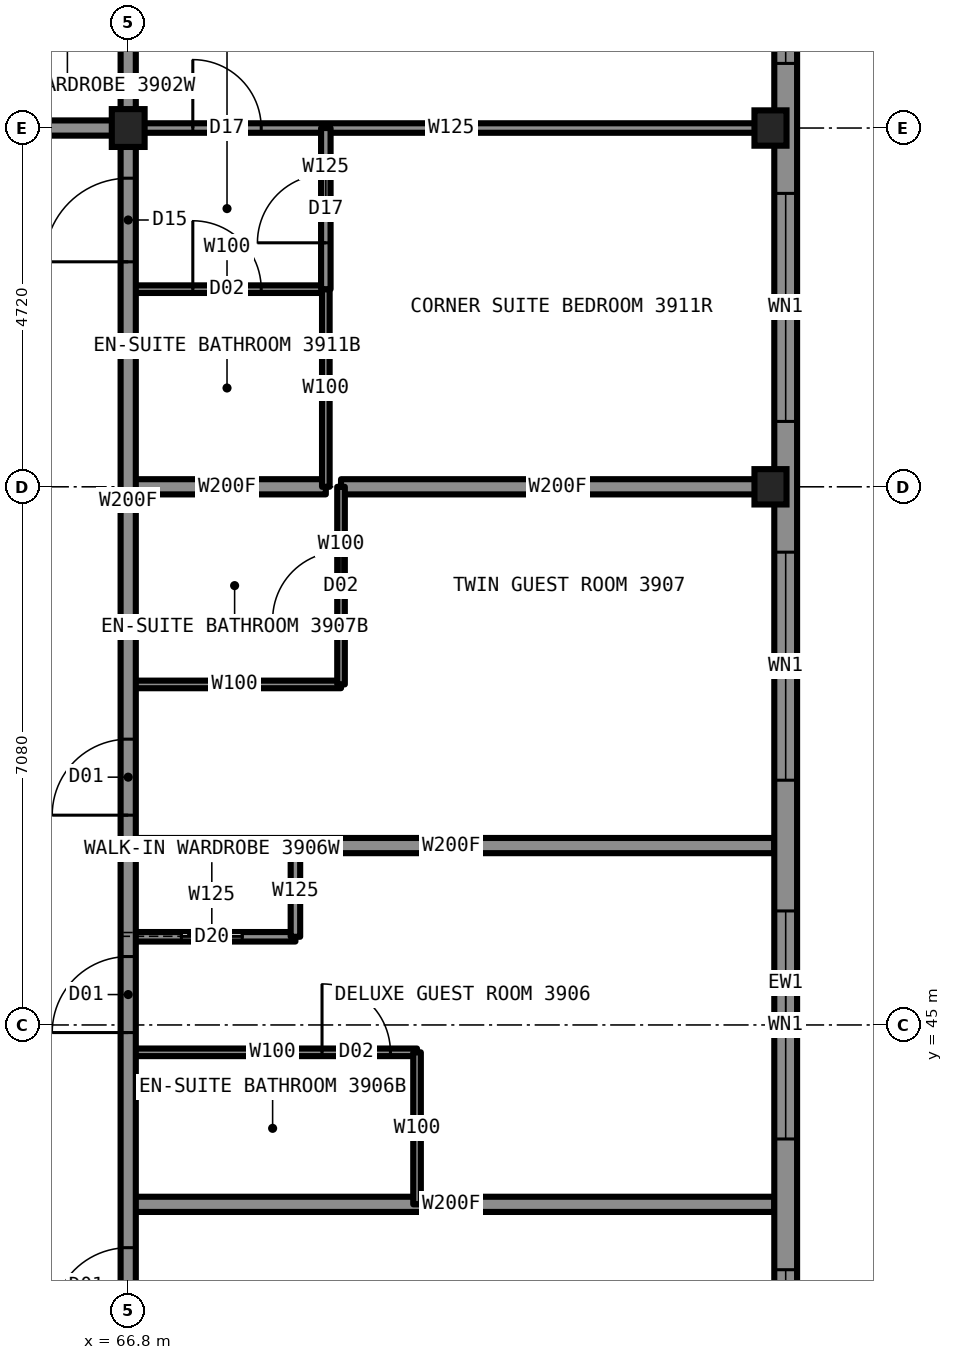
"""IFC4 building model, lengths in metres.
Left out: names, types, materials, properties, quantities, classifications, styles, units other than length and angle.
Written with IfcOpenShell. Run it as: python <this file> out.ifc"""

import sys

from ifc_helpers import new_model, si_unit, direction, frame, frame_2d, origin, origin_2d, place, context, subcontext, project, spatial, rectangle, i_section, extrude, element, fill, save


model = new_model("IFC4")
c1 = context("Model", 3, precision=1e-05, world=origin(), true_north=direction((0.0, 1.0)))
c2 = subcontext(c1, "Body", "Model", "MODEL_VIEW")
j1 = project(units=[si_unit("LENGTHUNIT", "METRE"), si_unit("PLANEANGLEUNIT", "RADIAN")], contexts=[c1])
p1 = place(None, origin())
s1 = spatial("IfcSite", under=j1, at=p1, CompositionType="ELEMENT")
p2 = place(p1, origin())
s2 = spatial("IfcBuilding", under=s1, at=p2, CompositionType="ELEMENT")
p3 = place(p2, frame((0.0, 0.0, 145.9)))
s3 = spatial("IfcBuildingStorey", under=s2, at=p3, CompositionType="ELEMENT", Elevation=145.9)
for number, where, z_axis, x_axis in (
    (1, (75.25, 52.08, 0.0), (0.0, 0.0, 1.0), (1.0, 0.0, 0.0)),
    (2, (75.25, 56.8, 0.0), (0.0, 0.0, 1.0), (1.0, 0.0, 0.0)),
):
    element("IfcColumn", number, at=place(p3, frame(where, z_axis=z_axis, x_axis=x_axis)), inside=s3, PredefinedType="COLUMN", context=c2, shape_type="SweptSolid", body=[
        extrude(i_section(OverallWidth=0.422, OverallDepth=0.465, WebThickness=0.045, FlangeThickness=0.073, at=origin_2d()), origin(), (0.0, 0.0, 1.0), 3.5),
    ])
p4 = place(p3, frame((66.8, 56.8, 0.0), z_axis=(0.0, 0.0, 1.0), x_axis=(1.0, 0.0, 0.0)))
e3 = element("IfcColumn", 3, at=p4, inside=s3, PredefinedType="COLUMN", context=c2, shape_type="SweptSolid", body=[
    extrude(i_section(OverallWidth=0.432, OverallDepth=0.498, WebThickness=0.056, FlangeThickness=0.089, at=origin_2d()), origin(), (0.0, 0.0, 1.0), 3.5),
])
p5 = place(p3, frame((66.8, 44.64, 0.0), z_axis=(0.0, 0.0, 1.0), x_axis=(1.0, 0.0, 0.0)))
e4 = element("IfcWall", 4, at=p5, inside=s3, PredefinedType="PARTITIONING", context=c2, shape_type="SweptSolid", body=[
    extrude(rectangle(XDim=3.8, YDim=0.1, at=frame_2d((1.9, 0.0))), origin(), (0.0, 0.0, 1.0), 3.33),
])
p6 = place(p5, frame((2.55, 0.0, 0.0)))
e5 = element("IfcOpeningElement", 5, at=p6, cuts=e4, PredefinedType="OPENING", context=c2, shape_type="SweptSolid", body=[
    extrude(rectangle(XDim=0.9, YDim=2.1, at=frame_2d((0.45, 1.05))), frame((0.0, 0.06, 0.0), z_axis=(0.0, -1.0, 0.0), x_axis=(1.0, 0.0, 0.0)), (0.0, 0.0, 1.0), 0.12),
])
p7 = place(p3, frame((66.8, 42.64, 0.0), z_axis=(0.0, 0.0, 1.0), x_axis=(1.0, 0.0, 0.0)))
e6 = element("IfcWall", 6, at=p7, inside=s3, PredefinedType="PARTITIONING", context=c2, shape_type="SweptSolid", body=[
    extrude(rectangle(XDim=8.5, YDim=0.2, at=frame_2d((4.25, 0.0))), origin(), (0.0, 0.0, 1.0), 2.731),
])
p8 = place(p3, frame((66.8, 46.16, 0.0), z_axis=(0.0, 0.0, 1.0), x_axis=(1.0, 0.0, 0.0)))
e7 = element("IfcWall", 7, at=p8, inside=s3, PredefinedType="PARTITIONING", context=c2, shape_type="SweptSolid", body=[
    extrude(rectangle(XDim=2.2, YDim=0.125, at=frame_2d((1.1, 0.0))), origin(), (0.0, 0.0, 1.0), 3.33),
])
p9 = place(p8, frame((0.7, 0.0, 0.0)))
e8 = element("IfcOpeningElement", 8, at=p9, cuts=e7, PredefinedType="OPENING", context=c2, shape_type="SweptSolid", body=[
    extrude(rectangle(XDim=0.8, YDim=2.1, at=frame_2d((0.4, 1.05))), frame((0.0, 0.073, 0.0), z_axis=(0.0, -1.0, 0.0), x_axis=(1.0, 0.0, 0.0)), (0.0, 0.0, 1.0), 0.145),
])
p10 = place(p3, frame((43.2, 56.8, 0.0), z_axis=(0.0, 0.0, 1.0), x_axis=(1.0, 0.0, 0.0)))
e9 = element("IfcWall", 9, at=p10, inside=s3, PredefinedType="PARTITIONING", context=c2, shape_type="SweptSolid", body=[
    extrude(rectangle(XDim=23.6, YDim=0.2, at=frame_2d((11.8, 0.0))), origin(), (0.0, 0.0, 1.0), 3.33),
])
p11 = place(p10, frame((1.85, 0.0, 0.0)))
e10 = element("IfcOpeningElement", 10, at=p11, cuts=e9, PredefinedType="OPENING", context=c2, shape_type="SweptSolid", body=[
    extrude(rectangle(XDim=1.1, YDim=2.2, at=frame_2d((0.55, 1.1))), frame((0.0, 0.11, 0.0), z_axis=(0.0, -1.0, 0.0), x_axis=(1.0, 0.0, 0.0)), (0.0, 0.0, 1.0), 0.22),
])
p12 = place(p10, frame((17.16, 0.0, 0.0)))
e11 = element("IfcOpeningElement", 11, at=p12, cuts=e9, PredefinedType="OPENING", context=c2, shape_type="SweptSolid", body=[
    extrude(rectangle(XDim=1.0, YDim=2.2, at=frame_2d((0.5, 1.1))), frame((0.0, 0.11, 0.0), z_axis=(0.0, -1.0, 0.0), x_axis=(1.0, 0.0, 0.0)), (0.0, 0.0, 1.0), 0.22),
])
p13 = place(p3, frame((66.8, 56.8, 0.0), z_axis=(0.0, 0.0, 1.0), x_axis=(1.0, 0.0, 0.0)))
e12 = element("IfcWall", 12, at=p13, inside=s3, PredefinedType="PARTITIONING", context=c2, shape_type="SweptSolid", body=[
    extrude(rectangle(XDim=8.5, YDim=0.125, at=frame_2d((4.25, 0.0))), origin(), (0.0, 0.0, 1.0), 2.573),
])
p14 = place(p13, frame((0.85, 0.0, 0.0)))
e13 = element("IfcOpeningElement", 13, at=p14, cuts=e12, PredefinedType="OPENING", context=c2, shape_type="SweptSolid", body=[
    extrude(rectangle(XDim=0.9, YDim=2.2, at=frame_2d((0.45, 1.1))), frame((0.0, 0.073, 0.0), z_axis=(0.0, -1.0, 0.0), x_axis=(1.0, 0.0, 0.0)), (0.0, 0.0, 1.0), 0.145),
])
p15 = place(p3, frame((66.8, 47.36, 0.0), z_axis=(0.0, 0.0, 1.0), x_axis=(1.0, 0.0, 0.0)))
e14 = element("IfcWall", 14, at=p15, inside=s3, PredefinedType="PARTITIONING", context=c2, shape_type="SweptSolid", body=[
    extrude(rectangle(XDim=8.5, YDim=0.2, at=frame_2d((4.25, 0.0))), origin(), (0.0, 0.0, 1.0), 2.731),
])
p16 = place(p3, frame((66.8, 49.48, 0.0), z_axis=(0.0, 0.0, 1.0), x_axis=(1.0, 0.0, 0.0)))
e15 = element("IfcWall", 15, at=p16, inside=s3, PredefinedType="PARTITIONING", context=c2, shape_type="SweptSolid", body=[
    extrude(rectangle(XDim=2.8, YDim=0.1, at=frame_2d((1.4, 0.0))), origin(), (0.0, 0.0, 1.0), 3.33),
])
p17 = place(p3, frame((66.8, 52.08, 0.0), z_axis=(0.0, 0.0, 1.0), x_axis=(1.0, 0.0, 0.0)))
e16 = element("IfcWall", 16, at=p17, inside=s3, PredefinedType="PARTITIONING", context=c2, shape_type="SweptSolid", body=[
    extrude(rectangle(XDim=2.6, YDim=0.2, at=frame_2d((1.3, 0.0))), origin(), (0.0, 0.0, 1.0), 2.573),
])
p18 = place(p3, frame((69.6, 52.08, 0.0), z_axis=(0.0, 0.0, 1.0), x_axis=(1.0, 0.0, 0.0)))
e17 = element("IfcWall", 17, at=p18, inside=s3, PredefinedType="PARTITIONING", context=c2, shape_type="SweptSolid", body=[
    extrude(rectangle(XDim=5.7, YDim=0.2, at=frame_2d((2.85, 0.0))), origin(), (0.0, 0.0, 1.0), 2.573),
])
p19 = place(p3, frame((66.8, 54.68, 0.0), z_axis=(0.0, 0.0, 1.0), x_axis=(1.0, 0.0, 0.0)))
e18 = element("IfcWall", 18, at=p19, inside=s3, PredefinedType="PARTITIONING", context=c2, shape_type="SweptSolid", body=[
    extrude(rectangle(XDim=2.6, YDim=0.1, at=frame_2d((1.3, 0.0))), origin(), (0.0, 0.0, 1.0), 3.33),
])
p20 = place(p19, frame((0.85, 0.0, 0.0)))
e19 = element("IfcOpeningElement", 19, at=p20, cuts=e18, PredefinedType="OPENING", context=c2, shape_type="SweptSolid", body=[
    extrude(rectangle(XDim=0.9, YDim=2.1, at=frame_2d((0.45, 1.05))), frame((0.0, 0.06, 0.0), z_axis=(0.0, -1.0, 0.0), x_axis=(1.0, 0.0, 0.0)), (0.0, 0.0, 1.0), 0.12),
])
p21 = place(p3, frame((66.8, 33.2, 0.0), z_axis=(0.0, 0.0, 1.0), x_axis=(0.0, 1.0, 0.0)))
e20 = element("IfcWall", 20, at=p21, inside=s3, PredefinedType="PARTITIONING", context=c2, shape_type="SweptSolid", body=[
    extrude(rectangle(XDim=23.6, YDim=0.2, at=frame_2d((11.8, 0.0))), origin(), (0.0, 0.0, 1.0), 3.33),
])
p22 = place(p21, frame((7.87, 0.0, 0.0)))
e21 = element("IfcOpeningElement", 21, at=p22, cuts=e20, PredefinedType="OPENING", context=c2, shape_type="SweptSolid", body=[
    extrude(rectangle(XDim=1.0, YDim=2.2, at=frame_2d((0.5, 1.1))), frame((0.0, 0.11, 0.0), z_axis=(0.0, -1.0, 0.0), x_axis=(1.0, 0.0, 0.0)), (0.0, 0.0, 1.0), 0.22),
])
p23 = place(p21, frame((11.7, 0.0, 0.0)))
e22 = element("IfcOpeningElement", 22, at=p23, cuts=e20, PredefinedType="OPENING", context=c2, shape_type="SweptSolid", body=[
    extrude(rectangle(XDim=1.0, YDim=2.2, at=frame_2d((0.5, 1.1))), frame((0.0, 0.11, 0.0), z_axis=(0.0, -1.0, 0.0), x_axis=(1.0, 0.0, 0.0)), (0.0, 0.0, 1.0), 0.22),
])
p24 = place(p21, frame((14.56, 0.0, 0.0)))
e23 = element("IfcOpeningElement", 23, at=p24, cuts=e20, PredefinedType="OPENING", context=c2, shape_type="SweptSolid", body=[
    extrude(rectangle(XDim=1.0, YDim=2.2, at=frame_2d((0.5, 1.1))), frame((0.0, 0.11, 0.0), z_axis=(0.0, -1.0, 0.0), x_axis=(1.0, 0.0, 0.0)), (0.0, 0.0, 1.0), 0.22),
])
p25 = place(p21, frame((21.84, 0.0, 0.0)))
e24 = element("IfcOpeningElement", 24, at=p25, cuts=e20, PredefinedType="OPENING", context=c2, shape_type="SweptSolid", body=[
    extrude(rectangle(XDim=1.1, YDim=2.2, at=frame_2d((0.55, 1.1))), frame((0.0, 0.11, 0.0), z_axis=(0.0, -1.0, 0.0), x_axis=(1.0, 0.0, 0.0)), (0.0, 0.0, 1.0), 0.22),
])
p26 = place(p21, frame((0.66, 0.0, 0.0)))
e25 = element("IfcOpeningElement", 25, at=p26, cuts=e20, PredefinedType="OPENING", context=c2, shape_type="SweptSolid", body=[
    extrude(rectangle(XDim=1.1, YDim=2.2, at=frame_2d((0.55, 1.1))), frame((0.0, 0.11, 0.0), z_axis=(0.0, -1.0, 0.0), x_axis=(1.0, 0.0, 0.0)), (0.0, 0.0, 1.0), 0.22),
])
p27 = place(p3, frame((66.8, 56.8, 0.0), z_axis=(0.0, 0.0, 1.0), x_axis=(0.0, 1.0, 0.0)))
e26 = element("IfcWall", 26, at=p27, inside=s3, PredefinedType="PARTITIONING", context=c2, shape_type="SweptSolid", body=[
    extrude(rectangle(XDim=8.5, YDim=0.2, at=frame_2d((4.25, 0.0))), origin(), (0.0, 0.0, 1.0), 2.573),
])
p28 = place(p3, frame((69.0, 46.16, 0.0), z_axis=(0.0, 0.0, 1.0), x_axis=(0.0, 1.0, 0.0)))
e27 = element("IfcWall", 27, at=p28, inside=s3, PredefinedType="PARTITIONING", context=c2, shape_type="SweptSolid", body=[
    extrude(rectangle(XDim=1.2, YDim=0.125, at=frame_2d((0.6, 0.0))), origin(), (0.0, 0.0, 1.0), 3.33),
])
p29 = place(p3, frame((69.4, 52.08, 0.0), z_axis=(0.0, 0.0, 1.0), x_axis=(0.0, 1.0, 0.0)))
e28 = element("IfcWall", 28, at=p29, inside=s3, PredefinedType="PARTITIONING", context=c2, shape_type="SweptSolid", body=[
    extrude(rectangle(XDim=2.6, YDim=0.1, at=frame_2d((1.3, 0.0))), origin(), (0.0, 0.0, 1.0), 3.33),
])
p30 = place(p3, frame((69.4, 54.68, 0.0), z_axis=(0.0, 0.0, 1.0), x_axis=(0.0, 1.0, 0.0)))
e29 = element("IfcWall", 29, at=p30, inside=s3, PredefinedType="PARTITIONING", context=c2, shape_type="SweptSolid", body=[
    extrude(rectangle(XDim=2.12, YDim=0.125, at=frame_2d((1.06, 0.0))), origin(), (0.0, 0.0, 1.0), 3.33),
])
p31 = place(p30, frame((0.61, 0.0, 0.0)))
e30 = element("IfcOpeningElement", 30, at=p31, cuts=e29, PredefinedType="OPENING", context=c2, shape_type="SweptSolid", body=[
    extrude(rectangle(XDim=0.9, YDim=2.2, at=frame_2d((0.45, 1.1))), frame((0.0, 0.073, 0.0), z_axis=(0.0, -1.0, 0.0), x_axis=(1.0, 0.0, 0.0)), (0.0, 0.0, 1.0), 0.145),
])
p32 = place(p3, frame((69.6, 49.48, 0.0), z_axis=(0.0, 0.0, 1.0), x_axis=(0.0, 1.0, 0.0)))
e31 = element("IfcWall", 31, at=p32, inside=s3, PredefinedType="PARTITIONING", context=c2, shape_type="SweptSolid", body=[
    extrude(rectangle(XDim=2.6, YDim=0.1, at=frame_2d((1.3, 0.0))), origin(), (0.0, 0.0, 1.0), 3.33),
])
p33 = place(p32, frame((0.85, 0.0, 0.0)))
e32 = element("IfcOpeningElement", 32, at=p33, cuts=e31, PredefinedType="OPENING", context=c2, shape_type="SweptSolid", body=[
    extrude(rectangle(XDim=0.9, YDim=2.1, at=frame_2d((0.45, 1.05))), frame((0.0, 0.06, 0.0), z_axis=(0.0, -1.0, 0.0), x_axis=(1.0, 0.0, 0.0)), (0.0, 0.0, 1.0), 0.12),
])
p34 = place(p3, frame((70.6, 42.64, 0.0), z_axis=(0.0, 0.0, 1.0), x_axis=(0.0, 1.0, 0.0)))
e33 = element("IfcWall", 33, at=p34, inside=s3, PredefinedType="PARTITIONING", context=c2, shape_type="SweptSolid", body=[
    extrude(rectangle(XDim=2.0, YDim=0.1, at=frame_2d((1.0, 0.0))), origin(), (0.0, 0.0, 1.0), 3.33),
])
p35 = place(p3, frame((75.45, 29.9, 0.0), z_axis=(0.0, 0.0, 1.0), x_axis=(0.0, 1.0, 0.0)))
e34 = element("IfcWall", 34, at=p35, inside=s3, PredefinedType="SOLIDWALL", context=c2, shape_type="SweptSolid", body=[
    extrude(rectangle(XDim=30.2, YDim=0.3, at=frame_2d((15.1, 0.0))), origin(), (0.0, 0.0, 1.0), 2.83),
])
p36 = place(p35, frame((1.3, 0.0, 0.8)))
e35 = element("IfcOpeningElement", 35, at=p36, cuts=e34, PredefinedType="OPENING", context=c2, shape_type="SweptSolid", body=[
    extrude(rectangle(XDim=1.1, YDim=1.7, at=frame_2d((0.55, 0.85))), frame((0.0, 0.16, 0.0), z_axis=(0.0, -1.0, 0.0), x_axis=(1.0, 0.0, 0.0)), (0.0, 0.0, 1.0), 0.32),
])
p37 = place(p35, frame((4.16, 0.0, 0.5)))
e36 = element("IfcOpeningElement", 36, at=p37, cuts=e34, PredefinedType="OPENING", context=c2, shape_type="SweptSolid", body=[
    extrude(rectangle(XDim=3.0, YDim=2.0, at=frame_2d((1.5, 1.0))), frame((0.0, 0.16, 0.0), z_axis=(0.0, -1.0, 0.0), x_axis=(1.0, 0.0, 0.0)), (0.0, 0.0, 1.0), 0.32),
])
p38 = place(p35, frame((8.88, 0.0, 0.5)))
e37 = element("IfcOpeningElement", 37, at=p38, cuts=e34, PredefinedType="OPENING", context=c2, shape_type="SweptSolid", body=[
    extrude(rectangle(XDim=3.0, YDim=2.0, at=frame_2d((1.5, 1.0))), frame((0.0, 0.16, 0.0), z_axis=(0.0, -1.0, 0.0), x_axis=(1.0, 0.0, 0.0)), (0.0, 0.0, 1.0), 0.32),
])
p39 = place(p35, frame((13.6, 0.0, 0.5)))
e38 = element("IfcOpeningElement", 38, at=p39, cuts=e34, PredefinedType="OPENING", context=c2, shape_type="SweptSolid", body=[
    extrude(rectangle(XDim=3.0, YDim=2.0, at=frame_2d((1.5, 1.0))), frame((0.0, 0.16, 0.0), z_axis=(0.0, -1.0, 0.0), x_axis=(1.0, 0.0, 0.0)), (0.0, 0.0, 1.0), 0.32),
])
p40 = place(p35, frame((18.32, 0.0, 0.5)))
e39 = element("IfcOpeningElement", 39, at=p40, cuts=e34, PredefinedType="OPENING", context=c2, shape_type="SweptSolid", body=[
    extrude(rectangle(XDim=3.0, YDim=2.0, at=frame_2d((1.5, 1.0))), frame((0.0, 0.16, 0.0), z_axis=(0.0, -1.0, 0.0), x_axis=(1.0, 0.0, 0.0)), (0.0, 0.0, 1.0), 0.32),
])
p41 = place(p35, frame((23.04, 0.0, 0.5)))
e40 = element("IfcOpeningElement", 40, at=p41, cuts=e34, PredefinedType="OPENING", context=c2, shape_type="SweptSolid", body=[
    extrude(rectangle(XDim=3.0, YDim=2.0, at=frame_2d((1.5, 1.0))), frame((0.0, 0.16, 0.0), z_axis=(0.0, -1.0, 0.0), x_axis=(1.0, 0.0, 0.0)), (0.0, 0.0, 1.0), 0.32),
])
p42 = place(p35, frame((27.75, 0.0, 0.8)))
e41 = element("IfcOpeningElement", 41, at=p42, cuts=e34, PredefinedType="OPENING", context=c2, shape_type="SweptSolid", body=[
    extrude(rectangle(XDim=1.1, YDim=1.7, at=frame_2d((0.55, 0.85))), frame((0.0, 0.16, 0.0), z_axis=(0.0, -1.0, 0.0), x_axis=(1.0, 0.0, 0.0)), (0.0, 0.0, 1.0), 0.32),
])
p43 = place(p22, origin())
e42 = element("IfcDoor", 42, at=p43, inside=s3, OperationType="SINGLE_SWING_LEFT", PredefinedType="DOOR", context=c2, shape_type="SweptSolid", body=[
    extrude(rectangle(XDim=1.0, YDim=2.2, at=frame_2d((0.5, 1.1))), frame((0.0, 0.025, 0.0), z_axis=(0.0, -1.0, 0.0), x_axis=(1.0, 0.0, 0.0)), (0.0, 0.0, 1.0), 0.05),
])
fill(e21, e42)
p44 = place(p23, origin())
e43 = element("IfcDoor", 43, at=p44, inside=s3, OperationType="SINGLE_SWING_LEFT", PredefinedType="DOOR", context=c2, shape_type="SweptSolid", body=[
    extrude(rectangle(XDim=1.0, YDim=2.2, at=frame_2d((0.5, 1.1))), frame((0.0, 0.025, 0.0), z_axis=(0.0, -1.0, 0.0), x_axis=(1.0, 0.0, 0.0)), (0.0, 0.0, 1.0), 0.05),
])
fill(e22, e43)
p45 = place(p6, origin())
e44 = element("IfcDoor", 44, at=p45, inside=s3, OperationType="SINGLE_SWING_RIGHT", PredefinedType="DOOR", context=c2, shape_type="SweptSolid", body=[
    extrude(rectangle(XDim=0.9, YDim=2.1, at=frame_2d((0.45, 1.05))), frame((0.0, 0.025, 0.0), z_axis=(0.0, -1.0, 0.0), x_axis=(1.0, 0.0, 0.0)), (0.0, 0.0, 1.0), 0.05),
])
fill(e5, e44)
p46 = place(p9, origin())
e45 = element("IfcDoor", 45, at=p46, inside=s3, OperationType="SLIDING_TO_LEFT", PredefinedType="DOOR", context=c2, shape_type="SweptSolid", body=[
    extrude(rectangle(XDim=0.8, YDim=2.1, at=frame_2d((0.4, 1.05))), frame((0.0, 0.025, 0.0), z_axis=(0.0, -1.0, 0.0), x_axis=(1.0, 0.0, 0.0)), (0.0, 0.0, 1.0), 0.05),
])
fill(e8, e45)
p47 = place(p24, origin())
e46 = element("IfcDoor", 46, at=p47, inside=s3, OperationType="SINGLE_SWING_LEFT", PredefinedType="DOOR", context=c2, shape_type="SweptSolid", body=[
    extrude(rectangle(XDim=1.0, YDim=2.2, at=frame_2d((0.5, 1.1))), frame((0.0, 0.025, 0.0), z_axis=(0.0, -1.0, 0.0), x_axis=(1.0, 0.0, 0.0)), (0.0, 0.0, 1.0), 0.05),
])
fill(e23, e46)
p48 = place(p33, origin())
e47 = element("IfcDoor", 47, at=p48, inside=s3, OperationType="SINGLE_SWING_RIGHT", PredefinedType="DOOR", context=c2, shape_type="SweptSolid", body=[
    extrude(rectangle(XDim=0.9, YDim=2.1, at=frame_2d((0.45, 1.05))), frame((0.0, 0.025, 0.0), z_axis=(0.0, -1.0, 0.0), x_axis=(1.0, 0.0, 0.0)), (0.0, 0.0, 1.0), 0.05),
])
fill(e32, e47)
p49 = place(p14, origin())
e48 = element("IfcDoor", 48, at=p49, inside=s3, OperationType="SINGLE_SWING_LEFT", PredefinedType="DOOR", context=c2, shape_type="SweptSolid", body=[
    extrude(rectangle(XDim=0.9, YDim=2.2, at=frame_2d((0.45, 1.1))), frame((0.0, 0.025, 0.0), z_axis=(0.0, -1.0, 0.0), x_axis=(1.0, 0.0, 0.0)), (0.0, 0.0, 1.0), 0.05),
])
fill(e13, e48)
p50 = place(p20, origin())
e49 = element("IfcDoor", 49, at=p50, inside=s3, OperationType="SINGLE_SWING_RIGHT", PredefinedType="DOOR", context=c2, shape_type="SweptSolid", body=[
    extrude(rectangle(XDim=0.9, YDim=2.1, at=frame_2d((0.45, 1.05))), frame((0.0, 0.025, 0.0), z_axis=(0.0, -1.0, 0.0), x_axis=(1.0, 0.0, 0.0)), (0.0, 0.0, 1.0), 0.05),
])
fill(e19, e49)
p51 = place(p25, origin())
e50 = element("IfcDoor", 50, at=p51, inside=s3, OperationType="SINGLE_SWING_LEFT", PredefinedType="DOOR", context=c2, shape_type="SweptSolid", body=[
    extrude(rectangle(XDim=1.1, YDim=2.2, at=frame_2d((0.55, 1.1))), frame((0.0, 0.025, 0.0), z_axis=(0.0, -1.0, 0.0), x_axis=(1.0, 0.0, 0.0)), (0.0, 0.0, 1.0), 0.05),
])
fill(e24, e50)
p52 = place(p31, origin())
e51 = element("IfcDoor", 51, at=p52, inside=s3, OperationType="SINGLE_SWING_LEFT", PredefinedType="DOOR", context=c2, shape_type="SweptSolid", body=[
    extrude(rectangle(XDim=0.9, YDim=2.2, at=frame_2d((0.45, 1.1))), frame((0.0, 0.025, 0.0), z_axis=(0.0, -1.0, 0.0), x_axis=(1.0, 0.0, 0.0)), (0.0, 0.0, 1.0), 0.05),
])
fill(e30, e51)
p53 = place(p38, origin())
e52 = element("IfcWindow", 52, at=p53, inside=s3, PartitioningType="SINGLE_PANEL", PredefinedType="WINDOW", context=c2, shape_type="SweptSolid", body=[
    extrude(rectangle(XDim=3.0, YDim=2.0, at=frame_2d((1.5, 1.0))), frame((0.0, 0.03, 0.0), z_axis=(0.0, -1.0, 0.0), x_axis=(1.0, 0.0, 0.0)), (0.0, 0.0, 1.0), 0.06),
])
fill(e37, e52)
p54 = place(p39, origin())
e53 = element("IfcWindow", 53, at=p54, inside=s3, PartitioningType="SINGLE_PANEL", PredefinedType="WINDOW", context=c2, shape_type="SweptSolid", body=[
    extrude(rectangle(XDim=3.0, YDim=2.0, at=frame_2d((1.5, 1.0))), frame((0.0, 0.03, 0.0), z_axis=(0.0, -1.0, 0.0), x_axis=(1.0, 0.0, 0.0)), (0.0, 0.0, 1.0), 0.06),
])
fill(e38, e53)
p55 = place(p40, origin())
e54 = element("IfcWindow", 54, at=p55, inside=s3, PartitioningType="SINGLE_PANEL", PredefinedType="WINDOW", context=c2, shape_type="SweptSolid", body=[
    extrude(rectangle(XDim=3.0, YDim=2.0, at=frame_2d((1.5, 1.0))), frame((0.0, 0.03, 0.0), z_axis=(0.0, -1.0, 0.0), x_axis=(1.0, 0.0, 0.0)), (0.0, 0.0, 1.0), 0.06),
])
fill(e39, e54)
p56 = place(p41, origin())
e55 = element("IfcWindow", 55, at=p56, inside=s3, PartitioningType="SINGLE_PANEL", PredefinedType="WINDOW", context=c2, shape_type="SweptSolid", body=[
    extrude(rectangle(XDim=3.0, YDim=2.0, at=frame_2d((1.5, 1.0))), frame((0.0, 0.03, 0.0), z_axis=(0.0, -1.0, 0.0), x_axis=(1.0, 0.0, 0.0)), (0.0, 0.0, 1.0), 0.06),
])
fill(e40, e55)
p57 = place(p42, origin())
e56 = element("IfcWindow", 56, at=p57, inside=s3, PartitioningType="SINGLE_PANEL", PredefinedType="WINDOW", context=c2, shape_type="SweptSolid", body=[
    extrude(rectangle(XDim=1.1, YDim=1.7, at=frame_2d((0.55, 0.85))), frame((0.0, 0.03, 0.0), z_axis=(0.0, -1.0, 0.0), x_axis=(1.0, 0.0, 0.0)), (0.0, 0.0, 1.0), 0.06),
])
fill(e41, e56)
save(model, sys.argv[1])
